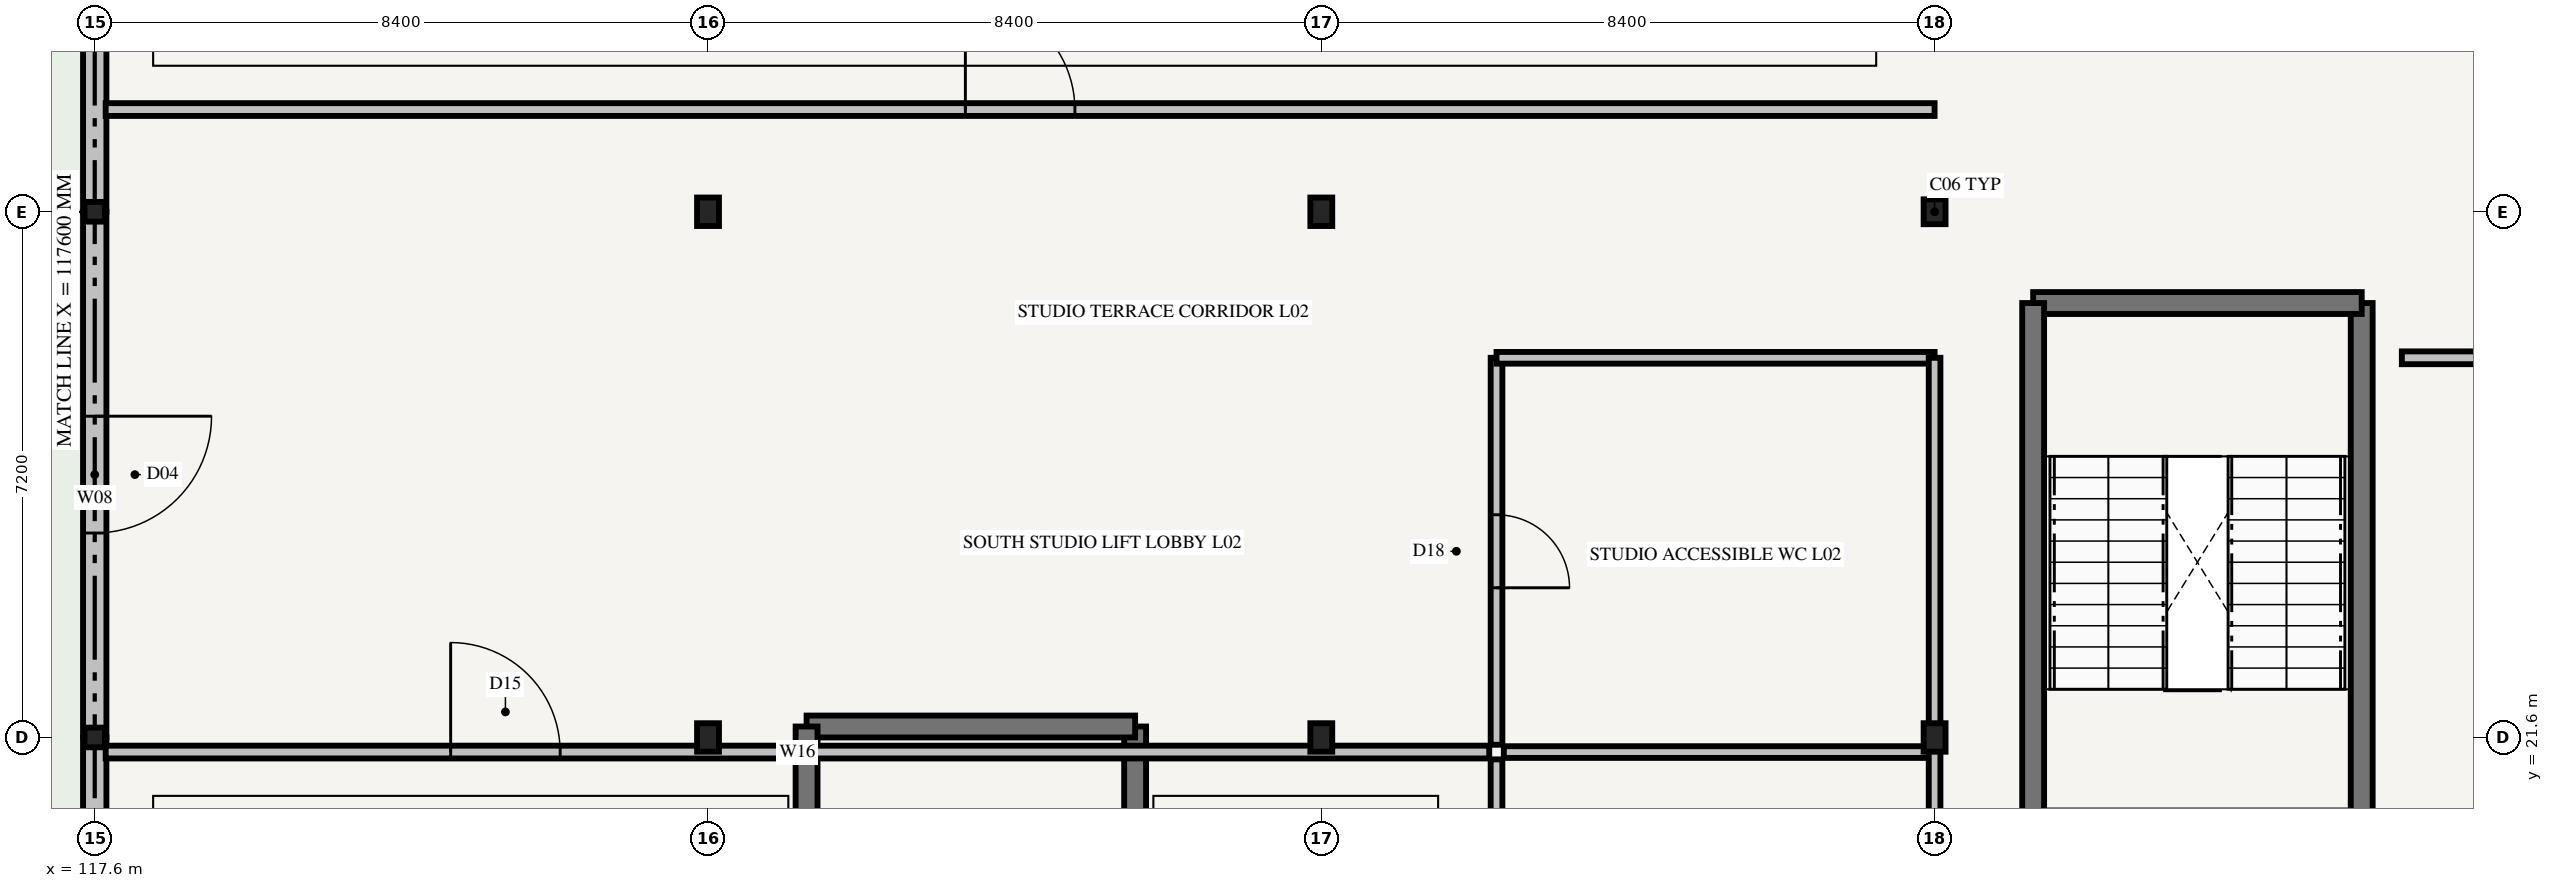
"""IFC4 building model, lengths in metres.
Left out: names, types, materials, properties, quantities, classifications, styles, units other than length and angle.
Written with IfcOpenShell. Run it as: python <this file> out.ifc"""

import sys

from ifc_helpers import new_model, si_unit, direction, frame, frame_2d, origin, origin_2d, place, context, subcontext, project, spatial, rectangle, i_section, extrude, element, fill, save


model = new_model("IFC4")
c1 = context("Model", 3, precision=1e-05, world=origin(), true_north=direction((0.0, 1.0)))
c2 = subcontext(c1, "Body", "Model", "MODEL_VIEW")
j1 = project(units=[si_unit("LENGTHUNIT", "METRE"), si_unit("PLANEANGLEUNIT", "RADIAN")], contexts=[c1])
p1 = place(None, origin())
s1 = spatial("IfcSite", under=j1, at=p1, CompositionType="ELEMENT")
p2 = place(p1, origin())
s2 = spatial("IfcBuilding", under=s1, at=p2, CompositionType="ELEMENT")
p3 = place(p2, frame((0.0, 0.0, 8.7)))
s3 = spatial("IfcBuildingStorey", under=s2, at=p3, CompositionType="ELEMENT", Elevation=8.7)
for number, where, z_axis, x_axis in (
    (1, (117.6, 21.6, 0.0), (0.0, 0.0, 1.0), (1.0, 0.0, 0.0)),
    (2, (117.6, 28.8, 0.0), (0.0, 0.0, 1.0), (1.0, 0.0, 0.0)),
):
    element("IfcColumn", number, at=place(p3, frame(where, z_axis=z_axis, x_axis=x_axis)), inside=s3, PredefinedType="COLUMN", context=c2, shape_type="SweptSolid", body=[
        extrude(i_section(OverallWidth=0.28, OverallDepth=0.27, WebThickness=0.008, FlangeThickness=0.013, FilletRadius=0.024, at=origin_2d()), origin(), (0.0, 0.0, 1.0), 4.2),
    ])
for number, where, z_axis, x_axis in (
    (3, (126.0, 21.6, 0.0), (0.0, 0.0, 1.0), (1.0, 0.0, 0.0)),
    (4, (126.0, 28.8, 0.0), (0.0, 0.0, 1.0), (1.0, 0.0, 0.0)),
    (5, (134.4, 21.6, 0.0), (0.0, 0.0, 1.0), (1.0, 0.0, 0.0)),
    (6, (134.4, 28.8, 0.0), (0.0, 0.0, 1.0), (1.0, 0.0, 0.0)),
    (7, (142.8, 21.6, 0.0), (0.0, 0.0, 1.0), (1.0, 0.0, 0.0)),
):
    element("IfcColumn", number, at=place(p3, frame(where, z_axis=z_axis, x_axis=x_axis)), inside=s3, PredefinedType="COLUMN", context=c2, shape_type="SweptSolid", body=[
        extrude(i_section(OverallWidth=0.3, OverallDepth=0.39, WebThickness=0.011, FlangeThickness=0.019, FilletRadius=0.027, at=origin_2d()), origin(), (0.0, 0.0, 1.0), 4.2),
    ])
p4 = place(p3, frame((142.8, 28.8, 0.0), z_axis=(0.0, 0.0, 1.0), x_axis=(1.0, 0.0, 0.0)))
e8 = element("IfcColumn", 8, at=p4, inside=s3, PredefinedType="COLUMN", context=c2, shape_type="SweptSolid", body=[
    extrude(i_section(OverallWidth=0.3, OverallDepth=0.34, WebThickness=0.012, FlangeThickness=0.021, FilletRadius=0.027, at=origin_2d()), origin(), (0.0, 0.0, 1.0), 4.2),
])
p5 = place(p3, frame((117.6, 36.0, 0.0), z_axis=(0.0, 0.0, 1.0), x_axis=(0.0, -1.0, 0.0)))
e9 = element("IfcWall", 9, at=p5, inside=s3, PredefinedType="STANDARD", context=c2, shape_type="SweptSolid", body=[
    extrude(rectangle(XDim=7.2, YDim=0.32, at=frame_2d((3.6, 0.0))), origin(), (0.0, 0.0, 1.0), 3.305),
])
p6 = place(p5, frame((2.9, 0.0, 0.85)))
e10 = element("IfcOpeningElement", 10, at=p6, cuts=e9, PredefinedType="OPENING", context=c2, shape_type="SweptSolid", body=[
    extrude(rectangle(XDim=1.4, YDim=1.2, at=frame_2d((0.7, 0.6))), frame((0.0, 0.185, 0.0), z_axis=(0.0, -1.0, 0.0), x_axis=(1.0, 0.0, 0.0)), (0.0, 0.0, 1.0), 0.37),
])
p7 = place(p3, frame((117.6, 28.8, 0.0), z_axis=(0.0, 0.0, 1.0), x_axis=(0.0, -1.0, 0.0)))
e11 = element("IfcWall", 11, at=p7, inside=s3, PredefinedType="STANDARD", context=c2, shape_type="SweptSolid", body=[
    extrude(rectangle(XDim=7.2, YDim=0.32, at=frame_2d((3.6, 0.0))), origin(), (0.0, 0.0, 1.0), 3.305),
])
p8 = place(p7, frame((2.8, 0.0, 0.0)))
e12 = element("IfcOpeningElement", 12, at=p8, cuts=e11, PredefinedType="OPENING", context=c2, shape_type="SweptSolid", body=[
    extrude(rectangle(XDim=1.6, YDim=2.3, at=frame_2d((0.8, 1.15))), frame((0.0, 0.185, 0.0), z_axis=(0.0, -1.0, 0.0), x_axis=(1.0, 0.0, 0.0)), (0.0, 0.0, 1.0), 0.37),
])
p9 = place(p3, frame((117.6, 21.6, 0.0), z_axis=(0.0, 0.0, 1.0), x_axis=(0.0, -1.0, 0.0)))
e13 = element("IfcWall", 13, at=p9, inside=s3, PredefinedType="STANDARD", context=c2, shape_type="SweptSolid", body=[
    extrude(rectangle(XDim=7.2, YDim=0.32, at=frame_2d((3.6, 0.0))), origin(), (0.0, 0.0, 1.0), 3.405),
])
p10 = place(p9, frame((3.0, 0.0, 0.0)))
e14 = element("IfcOpeningElement", 14, at=p10, cuts=e13, PredefinedType="OPENING", context=c2, shape_type="SweptSolid", body=[
    extrude(rectangle(XDim=1.2, YDim=2.25, at=frame_2d((0.6, 1.125))), frame((0.0, 0.185, 0.0), z_axis=(0.0, -1.0, 0.0), x_axis=(1.0, 0.0, 0.0)), (0.0, 0.0, 1.0), 0.37),
])
p11 = place(p3, frame((131.85, 14.65, 0.0), z_axis=(0.0, 0.0, 1.0), x_axis=(0.0, 1.0, 0.0)))
e15 = element("IfcWall", 15, at=p11, inside=s3, PredefinedType="SHEAR", context=c2, shape_type="SweptSolid", body=[
    extrude(rectangle(XDim=7.1, YDim=0.3, at=frame_2d((3.55, 0.0))), origin(), (0.0, 0.0, 1.0), 4.0),
])
p12 = place(p3, frame((131.85, 21.75, 0.0), z_axis=(0.0, 0.0, 1.0), x_axis=(-1.0, 0.0, 0.0)))
e16 = element("IfcWall", 16, at=p12, inside=s3, PredefinedType="SHEAR", context=c2, shape_type="SweptSolid", body=[
    extrude(rectangle(XDim=4.5, YDim=0.3, at=frame_2d((2.25, 0.0))), origin(), (0.0, 0.0, 1.0), 4.0),
])
for number, where, z_axis, x_axis in (
    (17, (127.35, 21.75, 0.0), (0.0, 0.0, 1.0), (0.0, -1.0, 0.0)),
    (18, (148.65, 20.45, 0.0), (0.0, 0.0, 1.0), (0.0, 1.0, 0.0)),
):
    element("IfcWall", number, at=place(p3, frame(where, z_axis=z_axis, x_axis=x_axis)), inside=s3, PredefinedType="SHEAR", context=c2, shape_type="SweptSolid", body=[
        extrude(rectangle(XDim=7.1, YDim=0.3, at=frame_2d((3.55, 0.0))), origin(), (0.0, 0.0, 1.0), 4.0),
    ])
p13 = place(p3, frame((148.65, 27.55, 0.0), z_axis=(0.0, 0.0, 1.0), x_axis=(-1.0, 0.0, 0.0)))
e19 = element("IfcWall", 19, at=p13, inside=s3, PredefinedType="SHEAR", context=c2, shape_type="SweptSolid", body=[
    extrude(rectangle(XDim=4.5, YDim=0.3, at=frame_2d((2.25, 0.0))), origin(), (0.0, 0.0, 1.0), 4.0),
])
p14 = place(p3, frame((144.15, 27.55, 0.0), z_axis=(0.0, 0.0, 1.0), x_axis=(0.0, -1.0, 0.0)))
e20 = element("IfcWall", 20, at=p14, inside=s3, PredefinedType="SHEAR", context=c2, shape_type="SweptSolid", body=[
    extrude(rectangle(XDim=7.1, YDim=0.3, at=frame_2d((3.55, 0.0))), origin(), (0.0, 0.0, 1.0), 4.0),
])
p15 = place(p3, frame((117.75, 21.4, 0.0), z_axis=(0.0, 0.0, 1.0), x_axis=(1.0, 0.0, 0.0)))
e21 = element("IfcWall", 21, at=p15, inside=s3, PredefinedType="PARTITIONING", context=c2, shape_type="SweptSolid", body=[
    extrude(rectangle(XDim=18.95, YDim=0.175, at=frame_2d((9.475, 0.0))), origin(), (0.0, 0.0, 1.0), 3.32),
])
p16 = place(p15, frame((4.725, 0.0, 0.0)))
e22 = element("IfcOpeningElement", 22, at=p16, cuts=e21, PredefinedType="OPENING", context=c2, shape_type="SweptSolid", body=[
    extrude(rectangle(XDim=1.5, YDim=2.2, at=frame_2d((0.75, 1.1))), frame((0.0, 0.112, 0.0), z_axis=(0.0, -1.0, 0.0), x_axis=(1.0, 0.0, 0.0)), (0.0, 0.0, 1.0), 0.225),
])
p17 = place(p3, frame((117.75, 30.2, 0.0), z_axis=(0.0, 0.0, 1.0), x_axis=(1.0, 0.0, 0.0)))
e23 = element("IfcWall", 23, at=p17, inside=s3, PredefinedType="PARTITIONING", context=c2, shape_type="SweptSolid", body=[
    extrude(rectangle(XDim=25.05, YDim=0.175, at=frame_2d((12.525, 0.0))), origin(), (0.0, 0.0, 1.0), 3.32),
])
p18 = place(p17, frame((11.775, 0.0, 0.0)))
e24 = element("IfcOpeningElement", 24, at=p18, cuts=e23, PredefinedType="OPENING", context=c2, shape_type="SweptSolid", body=[
    extrude(rectangle(XDim=1.5, YDim=2.2, at=frame_2d((0.75, 1.1))), frame((0.0, 0.112, 0.0), z_axis=(0.0, -1.0, 0.0), x_axis=(1.0, 0.0, 0.0)), (0.0, 0.0, 1.0), 0.225),
])
p19 = place(p3, frame((136.8, 14.5, 0.0), z_axis=(0.0, 0.0, 1.0), x_axis=(0.0, 1.0, 0.0)))
e25 = element("IfcWall", 25, at=p19, inside=s3, PredefinedType="PARTITIONING", context=c2, shape_type="SweptSolid", body=[
    extrude(rectangle(XDim=6.8, YDim=0.16, at=frame_2d((3.4, 0.0))), origin(), (0.0, 0.0, 1.0), 3.32),
])
p20 = place(p19, frame((2.925, 0.0, 0.0)))
e26 = element("IfcOpeningElement", 26, at=p20, cuts=e25, PredefinedType="OPENING", context=c2, shape_type="SweptSolid", body=[
    extrude(rectangle(XDim=0.95, YDim=2.15, at=frame_2d((0.475, 1.075))), frame((0.0, 0.105, 0.0), z_axis=(0.0, -1.0, 0.0), x_axis=(1.0, 0.0, 0.0)), (0.0, 0.0, 1.0), 0.21),
])
p21 = place(p3, frame((136.8, 21.5, 0.0), z_axis=(0.0, 0.0, 1.0), x_axis=(0.0, 1.0, 0.0)))
e27 = element("IfcWall", 27, at=p21, inside=s3, PredefinedType="PARTITIONING", context=c2, shape_type="SweptSolid", body=[
    extrude(rectangle(XDim=5.3, YDim=0.16, at=frame_2d((2.65, 0.0))), origin(), (0.0, 0.0, 1.0), 3.32),
])
p22 = place(p21, frame((2.15, 0.0, 0.0)))
e28 = element("IfcOpeningElement", 28, at=p22, cuts=e27, PredefinedType="OPENING", context=c2, shape_type="SweptSolid", body=[
    extrude(rectangle(XDim=1.0, YDim=2.15, at=frame_2d((0.5, 1.075))), frame((0.0, 0.105, 0.0), z_axis=(0.0, -1.0, 0.0), x_axis=(1.0, 0.0, 0.0)), (0.0, 0.0, 1.0), 0.21),
])
p23 = place(p3, frame((136.9, 21.4, 0.0), z_axis=(0.0, 0.0, 1.0), x_axis=(1.0, 0.0, 0.0)))
e29 = element("IfcWall", 29, at=p23, inside=s3, PredefinedType="PARTITIONING", context=c2, shape_type="SweptSolid", body=[
    extrude(rectangle(XDim=5.9, YDim=0.16, at=frame_2d((2.95, 0.0))), origin(), (0.0, 0.0, 1.0), 3.32),
])
p24 = place(p3, frame((136.8, 26.8, 0.0), z_axis=(0.0, 0.0, 1.0), x_axis=(1.0, 0.0, 0.0)))
e30 = element("IfcWall", 30, at=p24, inside=s3, PredefinedType="PARTITIONING", context=c2, shape_type="SweptSolid", body=[
    extrude(rectangle(XDim=6.0, YDim=0.16, at=frame_2d((3.0, 0.0))), origin(), (0.0, 0.0, 1.0), 3.32),
])
p25 = place(p3, frame((142.8, 7.35, 0.0), z_axis=(0.0, 0.0, 1.0), x_axis=(0.0, 1.0, 0.0)))
e31 = element("IfcWall", 31, at=p25, inside=s3, PredefinedType="PARTITIONING", context=c2, shape_type="SweptSolid", body=[
    extrude(rectangle(XDim=19.45, YDim=0.16, at=frame_2d((9.725, 0.0))), origin(), (0.0, 0.0, 1.0), 3.32),
])
p26 = place(p3, frame((149.2, 26.8, 0.0), z_axis=(0.0, 0.0, 1.0), x_axis=(1.0, 0.0, 0.0)))
e32 = element("IfcWall", 32, at=p26, inside=s3, PredefinedType="PARTITIONING", context=c2, shape_type="SweptSolid", body=[
    extrude(rectangle(XDim=5.4, YDim=0.175, at=frame_2d((2.7, 0.0))), origin(), (0.0, 0.0, 1.0), 3.32),
])
p27 = place(p8, frame((1.6, 0.0, 0.0), z_axis=(0.0, 0.0, 1.0), x_axis=(-1.0, 0.0, 0.0)))
e33 = element("IfcDoor", 33, at=p27, inside=s3, OperationType="DOUBLE_DOOR_SINGLE_SWING", PredefinedType="DOOR", context=c2, shape_type="SweptSolid", body=[
    extrude(rectangle(XDim=1.6, YDim=2.3, at=frame_2d((0.8, 1.15))), frame((0.0, 0.025, 0.0), z_axis=(0.0, -1.0, 0.0), x_axis=(1.0, 0.0, 0.0)), (0.0, 0.0, 1.0), 0.05),
])
fill(e12, e33)
p28 = place(p16, origin())
e34 = element("IfcDoor", 34, at=p28, inside=s3, OperationType="DOUBLE_DOOR_SINGLE_SWING", PredefinedType="DOOR", context=c2, shape_type="SweptSolid", body=[
    extrude(rectangle(XDim=1.5, YDim=2.2, at=frame_2d((0.75, 1.1))), frame((0.0, 0.025, 0.0), z_axis=(0.0, -1.0, 0.0), x_axis=(1.0, 0.0, 0.0)), (0.0, 0.0, 1.0), 0.05),
])
fill(e22, e34)
p29 = place(p18, frame((1.5, 0.0, 0.0), z_axis=(0.0, 0.0, 1.0), x_axis=(-1.0, 0.0, 0.0)))
e35 = element("IfcDoor", 35, at=p29, inside=s3, OperationType="DOUBLE_DOOR_SINGLE_SWING", PredefinedType="DOOR", context=c2, shape_type="SweptSolid", body=[
    extrude(rectangle(XDim=1.5, YDim=2.2, at=frame_2d((0.75, 1.1))), frame((0.0, 0.025, 0.0), z_axis=(0.0, -1.0, 0.0), x_axis=(1.0, 0.0, 0.0)), (0.0, 0.0, 1.0), 0.05),
])
fill(e24, e35)
p30 = place(p22, frame((1.0, 0.0, 0.0), z_axis=(0.0, 0.0, 1.0), x_axis=(-1.0, 0.0, 0.0)))
e36 = element("IfcDoor", 36, at=p30, inside=s3, OperationType="SINGLE_SWING_RIGHT", PredefinedType="DOOR", context=c2, shape_type="SweptSolid", body=[
    extrude(rectangle(XDim=1.0, YDim=2.15, at=frame_2d((0.5, 1.075))), frame((0.0, 0.025, 0.0), z_axis=(0.0, -1.0, 0.0), x_axis=(1.0, 0.0, 0.0)), (0.0, 0.0, 1.0), 0.05),
])
fill(e28, e36)
save(model, sys.argv[1])
